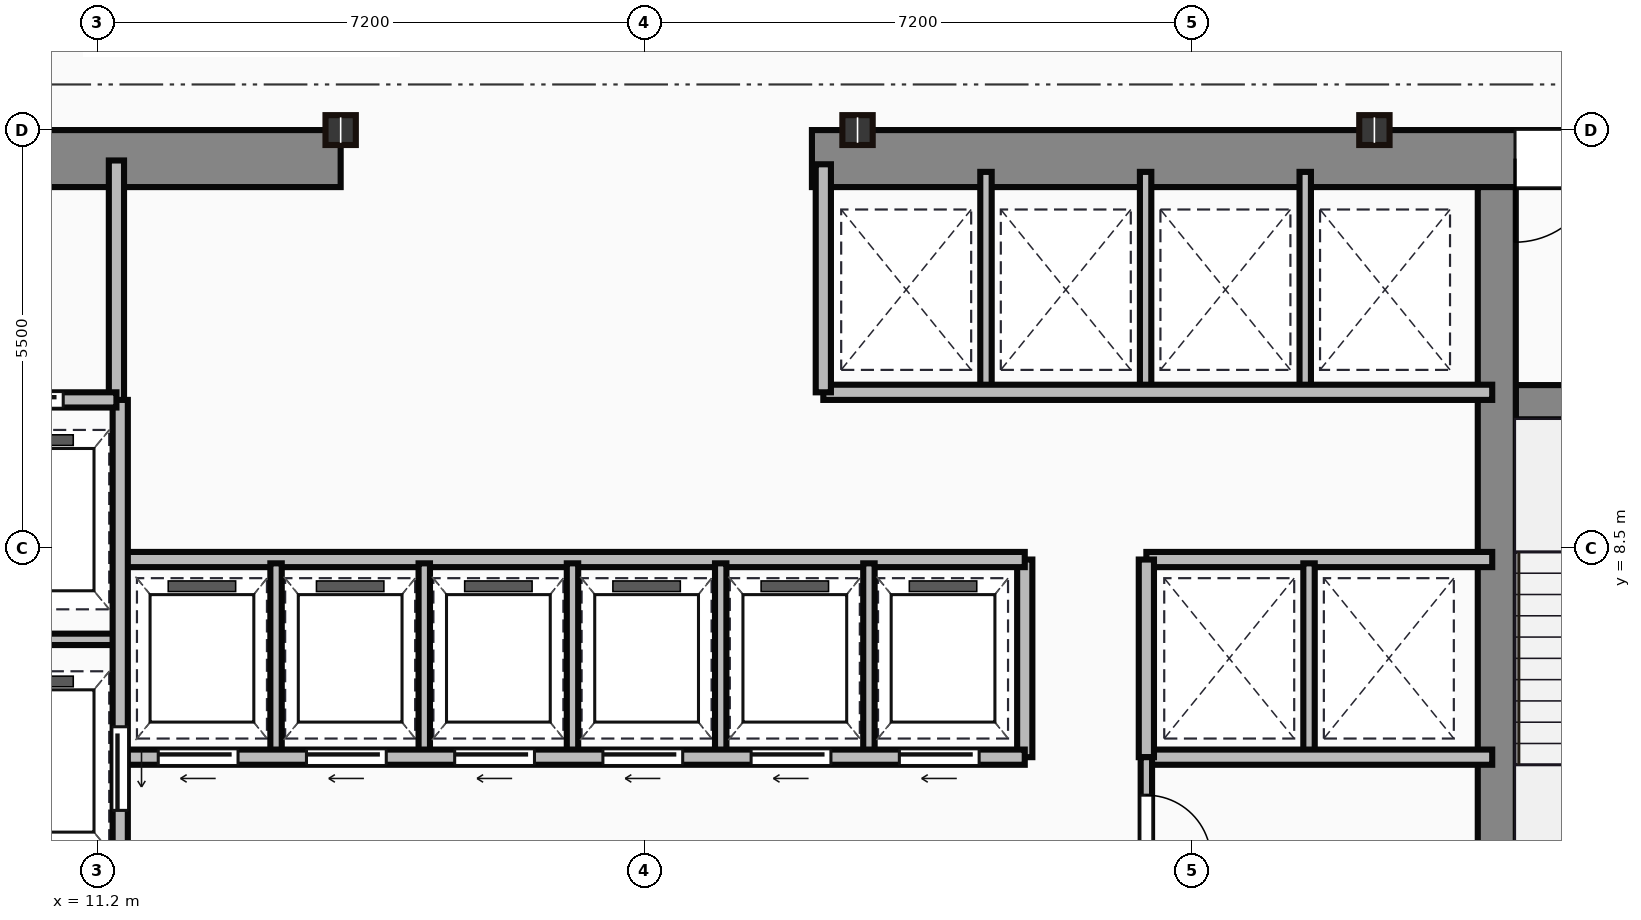
"""IFC4 building model, lengths in metres.
Left out: names, types, materials, properties, quantities, classifications, styles, units other than length and angle.
Written with IfcOpenShell. Run it as: python <this file> out.ifc"""

import sys

from ifc_helpers import new_model, si_unit, direction, frame, frame_2d, origin, origin_2d, place, context, subcontext, project, spatial, rectangle, i_section, extrude, source, transform, mapped, element, fill, save


model = new_model("IFC4")
c1 = context("Model", 3, precision=1e-05, world=origin(), true_north=direction((0.0, 1.0)))
c2 = subcontext(c1, "Body", "Model", "MODEL_VIEW")
j1 = project(units=[si_unit("LENGTHUNIT", "METRE"), si_unit("PLANEANGLEUNIT", "RADIAN")], contexts=[c1])
p1 = place(None, origin())
s1 = spatial("IfcSite", under=j1, at=p1, CompositionType="ELEMENT")
p2 = place(p1, origin())
s2 = spatial("IfcBuilding", under=s1, at=p2, CompositionType="ELEMENT")
p3 = place(p2, frame((0.0, 0.0, 103.25)))
s3 = spatial("IfcBuildingStorey", under=s2, at=p3, CompositionType="ELEMENT", Elevation=103.25)
m1 = source(origin(), c2, "Body", "SweptSolid", [
    extrude(rectangle(XDim=9.1, YDim=0.75, at=frame_2d((4.55, 0.0))), origin(), (0.0, 0.0, 1.0), 3.65),
])
p4 = place(p3, frame((5.3, 13.625, 0.0), z_axis=(0.0, 0.0, 1.0), x_axis=(1.0, 0.0, 0.0)))
e1 = element("IfcWall", 1, at=p4, inside=s3, PredefinedType="SHEAR", context=c2, shape_type="MappedRepresentation", body=[
    mapped(m1, transform((0.0, 0.0, 0.0))),
])
p5 = place(p4, frame((4.1, 0.0, 0.0)))
e2 = element("IfcOpeningElement", 2, at=p5, cuts=e1, PredefinedType="OPENING", context=c2, shape_type="SweptSolid", body=[
    extrude(rectangle(XDim=1.1, YDim=2.15, at=frame_2d((0.55, 1.075))), frame((0.0, 0.385, 0.0), z_axis=(0.0, -1.0, 0.0), x_axis=(1.0, 0.0, 0.0)), (0.0, 0.0, 1.0), 0.77),
])
m2 = source(origin(), c2, "Body", "SweptSolid", [
    extrude(rectangle(XDim=12.6, YDim=0.75, at=frame_2d((6.3, 0.0))), origin(), (0.0, 0.0, 1.0), 3.65),
])
p6 = place(p3, frame((20.6, 13.625, 0.0), z_axis=(0.0, 0.0, 1.0), x_axis=(1.0, 0.0, 0.0)))
e3 = element("IfcWall", 3, at=p6, inside=s3, PredefinedType="SHEAR", context=c2, shape_type="MappedRepresentation", body=[
    mapped(m2, transform((0.0, 0.0, 0.0))),
])
p7 = place(p6, frame((9.25, 0.0, 0.0)))
e4 = element("IfcOpeningElement", 4, at=p7, cuts=e3, PredefinedType="OPENING", context=c2, shape_type="SweptSolid", body=[
    extrude(rectangle(XDim=1.1, YDim=2.15, at=frame_2d((0.55, 1.075))), frame((0.0, 0.385, 0.0), z_axis=(0.0, -1.0, 0.0), x_axis=(1.0, 0.0, 0.0)), (0.0, 0.0, 1.0), 0.77),
])
m3 = source(origin(), c2, "Body", "SweptSolid", [
    extrude(rectangle(XDim=12.35, YDim=0.5, at=frame_2d((6.175, 0.0))), origin(), (0.0, 0.0, 1.0), 3.65),
])
p8 = place(p3, frame((29.61, 0.9, 0.0), z_axis=(0.0, 0.0, 1.0), x_axis=(0.0, 1.0, 0.0)))
e5 = element("IfcWall", 5, at=p8, inside=s3, PredefinedType="SHEAR", context=c2, shape_type="MappedRepresentation", body=[
    mapped(m3, transform((0.0, 0.0, 0.0))),
])
m4 = source(origin(), c2, "Body", "SweptSolid", [
    extrude(rectangle(XDim=3.39, YDim=0.45, at=frame_2d((1.695, 0.0))), origin(), (0.0, 0.0, 1.0), 3.65),
])
p9 = place(p3, frame((29.86, 10.42, 0.0), z_axis=(0.0, 0.0, 1.0), x_axis=(1.0, 0.0, 0.0)))
e6 = element("IfcWall", 6, at=p9, inside=s3, PredefinedType="SHEAR", context=c2, shape_type="MappedRepresentation", body=[
    mapped(m4, transform((0.0, 0.0, 0.0))),
])
p10 = place(p9, frame((1.1, 0.0, 0.0)))
e7 = element("IfcOpeningElement", 7, at=p10, cuts=e6, PredefinedType="OPENING", context=c2, shape_type="SweptSolid", body=[
    extrude(rectangle(XDim=1.1, YDim=2.15, at=frame_2d((0.55, 1.075))), frame((0.0, 0.235, 0.0), z_axis=(0.0, -1.0, 0.0), x_axis=(1.0, 0.0, 0.0)), (0.0, 0.0, 1.0), 0.47),
])
m5 = source(origin(), c2, "Body", "SweptSolid", [
    extrude(i_section(OverallWidth=0.399, OverallDepth=0.393, WebThickness=0.023, FlangeThickness=0.037, at=origin_2d()), origin(), (0.0, 0.0, 1.0), 3.65),
])
for number, where, z_axis, x_axis in (
    (8, (14.4, 14.0, 0.0), (0.0, 0.0, 1.0), (1.0, 0.0, 0.0)),
    (9, (21.2, 14.0, 0.0), (0.0, 0.0, 1.0), (1.0, 0.0, 0.0)),
    (10, (28.0, 14.0, 0.0), (0.0, 0.0, 1.0), (1.0, 0.0, 0.0)),
):
    element("IfcColumn", number, at=place(p3, frame(where, z_axis=z_axis, x_axis=x_axis)), inside=s3, PredefinedType="COLUMN", context=c2, shape_type="MappedRepresentation", body=[
        mapped(m5, transform((0.0, 0.0, 0.0))),
    ])
m6 = source(origin(), c2, "Body", "SweptSolid", [
    extrude(rectangle(XDim=3.18, YDim=0.2, at=frame_2d((1.59, 0.0))), origin(), (0.0, 0.0, 1.0), 3.4),
])
p11 = place(p3, frame((11.45, 10.42, 0.0), z_axis=(0.0, 0.0, 1.0), x_axis=(0.0, 1.0, 0.0)))
e11 = element("IfcWall", 11, at=p11, inside=s3, PredefinedType="PARTITIONING", context=c2, shape_type="MappedRepresentation", body=[
    mapped(m6, transform((0.0, 0.0, 0.0))),
])
m7 = source(origin(), c2, "Body", "SweptSolid", [
    extrude(rectangle(XDim=2.35, YDim=0.2, at=frame_2d((1.175, 0.0))), origin(), (0.0, 0.0, 1.0), 3.4),
])
p12 = place(p3, frame((9.1, 10.45, 0.0), z_axis=(0.0, 0.0, 1.0), x_axis=(1.0, 0.0, 0.0)))
e12 = element("IfcWall", 12, at=p12, inside=s3, PredefinedType="PARTITIONING", context=c2, shape_type="MappedRepresentation", body=[
    mapped(m7, transform((0.0, 0.0, 0.0))),
])
p13 = place(p12, frame((0.55, 0.0, 0.0)))
e13 = element("IfcOpeningElement", 13, at=p13, cuts=e12, PredefinedType="OPENING", context=c2, shape_type="SweptSolid", body=[
    extrude(rectangle(XDim=1.1, YDim=2.15, at=frame_2d((0.55, 1.075))), frame((0.0, 0.11, 0.0), z_axis=(0.0, -1.0, 0.0), x_axis=(1.0, 0.0, 0.0)), (0.0, 0.0, 1.0), 0.22),
])
m8 = source(origin(), c2, "Body", "SweptSolid", [
    extrude(rectangle(XDim=9.6, YDim=0.2, at=frame_2d((4.8, 0.0))), origin(), (0.0, 0.0, 1.0), 3.4),
])
p14 = place(p3, frame((11.5, 0.85, 0.0), z_axis=(0.0, 0.0, 1.0), x_axis=(0.0, 1.0, 0.0)))
e14 = element("IfcWall", 14, at=p14, inside=s3, PredefinedType="PARTITIONING", context=c2, shape_type="MappedRepresentation", body=[
    mapped(m8, transform((0.0, 0.0, 0.0))),
])
p15 = place(p14, frame((4.2, 0.0, 0.0)))
e15 = element("IfcOpeningElement", 15, at=p15, cuts=e14, PredefinedType="OPENING", context=c2, shape_type="SweptSolid", body=[
    extrude(rectangle(XDim=1.1, YDim=2.15, at=frame_2d((0.55, 1.075))), frame((0.0, 0.11, 0.0), z_axis=(0.0, -1.0, 0.0), x_axis=(1.0, 0.0, 0.0)), (0.0, 0.0, 1.0), 0.22),
])
p16 = place(p14, frame((0.9, 0.0, 0.0)))
e16 = element("IfcOpeningElement", 16, at=p16, cuts=e14, PredefinedType="OPENING", context=c2, shape_type="SweptSolid", body=[
    extrude(rectangle(XDim=1.2, YDim=2.15, at=frame_2d((0.6, 1.075))), frame((0.0, 0.11, 0.0), z_axis=(0.0, -1.0, 0.0), x_axis=(1.0, 0.0, 0.0)), (0.0, 0.0, 1.0), 0.22),
])
m9 = source(origin(), c2, "Body", "SweptSolid", [
    extrude(rectangle(XDim=2.4, YDim=0.15, at=frame_2d((1.2, 0.0))), origin(), (0.0, 0.0, 1.0), 3.4),
])
p17 = place(p3, frame((9.1, 7.3, 0.0), z_axis=(0.0, 0.0, 1.0), x_axis=(1.0, 0.0, 0.0)))
e17 = element("IfcWall", 17, at=p17, inside=s3, PredefinedType="PARTITIONING", context=c2, shape_type="MappedRepresentation", body=[
    mapped(m9, transform((0.0, 0.0, 0.0))),
])
m10 = source(origin(), c2, "Body", "SweptSolid", [
    extrude(rectangle(XDim=11.85, YDim=0.2, at=frame_2d((5.925, 0.0))), origin(), (0.0, 0.0, 1.0), 3.4),
])
p18 = place(p3, frame((11.55, 5.75, 0.0), z_axis=(0.0, 0.0, 1.0), x_axis=(1.0, 0.0, 0.0)))
e18 = element("IfcWall", 18, at=p18, inside=s3, PredefinedType="PARTITIONING", context=c2, shape_type="MappedRepresentation", body=[
    mapped(m10, transform((0.0, 0.0, 0.0))),
])
p19 = place(p18, frame((0.45, 0.0, 0.0)))
e19 = element("IfcOpeningElement", 19, at=p19, cuts=e18, PredefinedType="OPENING", context=c2, shape_type="SweptSolid", body=[
    extrude(rectangle(XDim=1.05, YDim=2.15, at=frame_2d((0.525, 1.075))), frame((0.0, 0.11, 0.0), z_axis=(0.0, -1.0, 0.0), x_axis=(1.0, 0.0, 0.0)), (0.0, 0.0, 1.0), 0.22),
])
p20 = place(p18, frame((2.4, 0.0, 0.0)))
e20 = element("IfcOpeningElement", 20, at=p20, cuts=e18, PredefinedType="OPENING", context=c2, shape_type="SweptSolid", body=[
    extrude(rectangle(XDim=1.05, YDim=2.15, at=frame_2d((0.525, 1.075))), frame((0.0, 0.11, 0.0), z_axis=(0.0, -1.0, 0.0), x_axis=(1.0, 0.0, 0.0)), (0.0, 0.0, 1.0), 0.22),
])
p21 = place(p18, frame((4.35, 0.0, 0.0)))
e21 = element("IfcOpeningElement", 21, at=p21, cuts=e18, PredefinedType="OPENING", context=c2, shape_type="SweptSolid", body=[
    extrude(rectangle(XDim=1.05, YDim=2.15, at=frame_2d((0.525, 1.075))), frame((0.0, 0.11, 0.0), z_axis=(0.0, -1.0, 0.0), x_axis=(1.0, 0.0, 0.0)), (0.0, 0.0, 1.0), 0.22),
])
p22 = place(p18, frame((6.3, 0.0, 0.0)))
e22 = element("IfcOpeningElement", 22, at=p22, cuts=e18, PredefinedType="OPENING", context=c2, shape_type="SweptSolid", body=[
    extrude(rectangle(XDim=1.05, YDim=2.15, at=frame_2d((0.525, 1.075))), frame((0.0, 0.11, 0.0), z_axis=(0.0, -1.0, 0.0), x_axis=(1.0, 0.0, 0.0)), (0.0, 0.0, 1.0), 0.22),
])
p23 = place(p18, frame((8.25, 0.0, 0.0)))
e23 = element("IfcOpeningElement", 23, at=p23, cuts=e18, PredefinedType="OPENING", context=c2, shape_type="SweptSolid", body=[
    extrude(rectangle(XDim=1.05, YDim=2.15, at=frame_2d((0.525, 1.075))), frame((0.0, 0.11, 0.0), z_axis=(0.0, -1.0, 0.0), x_axis=(1.0, 0.0, 0.0)), (0.0, 0.0, 1.0), 0.22),
])
p24 = place(p18, frame((10.2, 0.0, 0.0)))
e24 = element("IfcOpeningElement", 24, at=p24, cuts=e18, PredefinedType="OPENING", context=c2, shape_type="SweptSolid", body=[
    extrude(rectangle(XDim=1.05, YDim=2.15, at=frame_2d((0.525, 1.075))), frame((0.0, 0.11, 0.0), z_axis=(0.0, -1.0, 0.0), x_axis=(1.0, 0.0, 0.0)), (0.0, 0.0, 1.0), 0.22),
])
p25 = place(p3, frame((11.55, 8.35, 0.0), z_axis=(0.0, 0.0, 1.0), x_axis=(1.0, 0.0, 0.0)))
e25 = element("IfcWall", 25, at=p25, inside=s3, PredefinedType="PARTITIONING", context=c2, shape_type="MappedRepresentation", body=[
    mapped(m10, transform((0.0, 0.0, 0.0))),
])
m11 = source(origin(), c2, "Body", "SweptSolid", [
    extrude(rectangle(XDim=2.6, YDim=0.2, at=frame_2d((1.3, 0.0))), origin(), (0.0, 0.0, 1.0), 3.4),
])
p26 = place(p3, frame((23.4, 5.75, 0.0), z_axis=(0.0, 0.0, 1.0), x_axis=(0.0, 1.0, 0.0)))
e26 = element("IfcWall", 26, at=p26, inside=s3, PredefinedType="PARTITIONING", context=c2, shape_type="MappedRepresentation", body=[
    mapped(m11, transform((0.0, 0.0, 0.0))),
])
m12 = source(origin(), c2, "Body", "SweptSolid", [
    extrude(rectangle(XDim=2.5, YDim=0.15, at=frame_2d((1.25, 0.0))), origin(), (0.0, 0.0, 1.0), 3.4),
])
for number, where, z_axis, x_axis in (
    (27, (13.55, 5.8, 0.0), (0.0, 0.0, 1.0), (0.0, 1.0, 0.0)),
    (28, (15.5, 5.8, 0.0), (0.0, 0.0, 1.0), (0.0, 1.0, 0.0)),
    (29, (17.45, 5.8, 0.0), (0.0, 0.0, 1.0), (0.0, 1.0, 0.0)),
    (30, (19.4, 5.8, 0.0), (0.0, 0.0, 1.0), (0.0, 1.0, 0.0)),
    (31, (21.35, 5.8, 0.0), (0.0, 0.0, 1.0), (0.0, 1.0, 0.0)),
):
    element("IfcWall", number, at=place(p3, frame(where, z_axis=z_axis, x_axis=x_axis)), inside=s3, PredefinedType="PARTITIONING", context=c2, shape_type="MappedRepresentation", body=[
        mapped(m12, transform((0.0, 0.0, 0.0))),
    ])
m13 = source(origin(), c2, "Body", "SweptSolid", [
    extrude(rectangle(XDim=8.8, YDim=0.2, at=frame_2d((4.4, 0.0))), origin(), (0.0, 0.0, 1.0), 3.4),
])
p27 = place(p3, frame((20.75, 10.55, 0.0), z_axis=(0.0, 0.0, 1.0), x_axis=(1.0, 0.0, 0.0)))
e32 = element("IfcWall", 32, at=p27, inside=s3, PredefinedType="PARTITIONING", context=c2, shape_type="MappedRepresentation", body=[
    mapped(m13, transform((0.0, 0.0, 0.0))),
])
m14 = source(origin(), c2, "Body", "SweptSolid", [
    extrude(rectangle(XDim=3.0, YDim=0.2, at=frame_2d((1.5, 0.0))), origin(), (0.0, 0.0, 1.0), 3.4),
])
p28 = place(p3, frame((20.75, 10.55, 0.0), z_axis=(0.0, 0.0, 1.0), x_axis=(0.0, 1.0, 0.0)))
e33 = element("IfcWall", 33, at=p28, inside=s3, PredefinedType="PARTITIONING", context=c2, shape_type="MappedRepresentation", body=[
    mapped(m14, transform((0.0, 0.0, 0.0))),
])
m15 = source(origin(), c2, "Body", "SweptSolid", [
    extrude(rectangle(XDim=2.85, YDim=0.15, at=frame_2d((1.425, 0.0))), origin(), (0.0, 0.0, 1.0), 3.4),
])
for number, where, z_axis, x_axis in (
    (34, (22.89, 10.6, 0.0), (0.0, 0.0, 1.0), (0.0, 1.0, 0.0)),
    (35, (24.99, 10.6, 0.0), (0.0, 0.0, 1.0), (0.0, 1.0, 0.0)),
    (36, (27.09, 10.6, 0.0), (0.0, 0.0, 1.0), (0.0, 1.0, 0.0)),
):
    element("IfcWall", number, at=place(p3, frame(where, z_axis=z_axis, x_axis=x_axis)), inside=s3, PredefinedType="PARTITIONING", context=c2, shape_type="MappedRepresentation", body=[
        mapped(m15, transform((0.0, 0.0, 0.0))),
    ])
m16 = source(origin(), c2, "Body", "SweptSolid", [
    extrude(rectangle(XDim=4.55, YDim=0.2, at=frame_2d((2.275, 0.0))), origin(), (0.0, 0.0, 1.0), 3.4),
])
for number, where, z_axis, x_axis in (
    (37, (25.0, 8.35, 0.0), (0.0, 0.0, 1.0), (1.0, 0.0, 0.0)),
    (38, (25.0, 5.75, 0.0), (0.0, 0.0, 1.0), (1.0, 0.0, 0.0)),
):
    element("IfcWall", number, at=place(p3, frame(where, z_axis=z_axis, x_axis=x_axis)), inside=s3, PredefinedType="PARTITIONING", context=c2, shape_type="MappedRepresentation", body=[
        mapped(m16, transform((0.0, 0.0, 0.0))),
    ])
p29 = place(p3, frame((25.0, 5.75, 0.0), z_axis=(0.0, 0.0, 1.0), x_axis=(0.0, 1.0, 0.0)))
e39 = element("IfcWall", 39, at=p29, inside=s3, PredefinedType="PARTITIONING", context=c2, shape_type="MappedRepresentation", body=[
    mapped(m11, transform((0.0, 0.0, 0.0))),
])
p30 = place(p3, frame((27.14, 5.8, 0.0), z_axis=(0.0, 0.0, 1.0), x_axis=(0.0, 1.0, 0.0)))
e40 = element("IfcWall", 40, at=p30, inside=s3, PredefinedType="PARTITIONING", context=c2, shape_type="MappedRepresentation", body=[
    mapped(m12, transform((0.0, 0.0, 0.0))),
])
m17 = source(origin(), c2, "Body", "SweptSolid", [
    extrude(rectangle(XDim=4.9, YDim=0.15, at=frame_2d((2.45, 0.0))), origin(), (0.0, 0.0, 1.0), 3.4),
])
p31 = place(p3, frame((25.0, 0.85, 0.0), z_axis=(0.0, 0.0, 1.0), x_axis=(0.0, 1.0, 0.0)))
e41 = element("IfcWall", 41, at=p31, inside=s3, PredefinedType="PARTITIONING", context=c2, shape_type="MappedRepresentation", body=[
    mapped(m17, transform((0.0, 0.0, 0.0))),
])
p32 = place(p31, frame((1.85, 0.0, 0.0)))
e42 = element("IfcOpeningElement", 42, at=p32, cuts=e41, PredefinedType="OPENING", context=c2, shape_type="SweptSolid", body=[
    extrude(rectangle(XDim=0.95, YDim=2.15, at=frame_2d((0.475, 1.075))), frame((0.0, 0.085, 0.0), z_axis=(0.0, -1.0, 0.0), x_axis=(1.0, 0.0, 0.0)), (0.0, 0.0, 1.0), 0.17),
])
p33 = place(p31, frame((3.55, 0.0, 0.0)))
e43 = element("IfcOpeningElement", 43, at=p33, cuts=e41, PredefinedType="OPENING", context=c2, shape_type="SweptSolid", body=[
    extrude(rectangle(XDim=0.85, YDim=2.15, at=frame_2d((0.425, 1.075))), frame((0.0, 0.085, 0.0), z_axis=(0.0, -1.0, 0.0), x_axis=(1.0, 0.0, 0.0)), (0.0, 0.0, 1.0), 0.17),
])
m18 = source(origin(), c2, "Body", "SweptSolid", [
    extrude(rectangle(XDim=1.1, YDim=2.15, at=frame_2d((0.55, 1.075))), frame((0.0, 0.025, 0.0), z_axis=(0.0, -1.0, 0.0), x_axis=(1.0, 0.0, 0.0)), (0.0, 0.0, 1.0), 0.05),
])
p34 = place(p7, origin())
e44 = element("IfcDoor", 44, at=p34, inside=s3, OperationType="SINGLE_SWING_LEFT", PredefinedType="DOOR", context=c2, shape_type="MappedRepresentation", body=[
    mapped(m18, transform((0.0, 0.0, 0.0))),
])
fill(e4, e44)
p35 = place(p13, origin())
e45 = element("IfcDoor", 45, at=p35, inside=s3, OperationType="SLIDING_TO_LEFT", PredefinedType="DOOR", context=c2, shape_type="MappedRepresentation", body=[
    mapped(m18, transform((0.0, 0.0, 0.0))),
])
fill(e13, e45)
p36 = place(p15, frame((1.1, 0.0, 0.0), z_axis=(0.0, 0.0, 1.0), x_axis=(-1.0, 0.0, 0.0)))
e46 = element("IfcDoor", 46, at=p36, inside=s3, OperationType="SLIDING_TO_LEFT", PredefinedType="DOOR", context=c2, shape_type="MappedRepresentation", body=[
    mapped(m18, transform((0.0, 0.0, 0.0))),
])
fill(e15, e46)
m19 = source(origin(), c2, "Body", "SweptSolid", [
    extrude(rectangle(XDim=1.05, YDim=2.15, at=frame_2d((0.525, 1.075))), frame((0.0, 0.025, 0.0), z_axis=(0.0, -1.0, 0.0), x_axis=(1.0, 0.0, 0.0)), (0.0, 0.0, 1.0), 0.05),
])
p37 = place(p19, frame((1.05, 0.0, 0.0), z_axis=(0.0, 0.0, 1.0), x_axis=(-1.0, 0.0, 0.0)))
e47 = element("IfcDoor", 47, at=p37, inside=s3, OperationType="SLIDING_TO_LEFT", PredefinedType="DOOR", context=c2, shape_type="MappedRepresentation", body=[
    mapped(m19, transform((0.0, 0.0, 0.0))),
])
fill(e19, e47)
p38 = place(p20, frame((1.05, 0.0, 0.0), z_axis=(0.0, 0.0, 1.0), x_axis=(-1.0, 0.0, 0.0)))
e48 = element("IfcDoor", 48, at=p38, inside=s3, OperationType="SLIDING_TO_LEFT", PredefinedType="DOOR", context=c2, shape_type="MappedRepresentation", body=[
    mapped(m19, transform((0.0, 0.0, 0.0))),
])
fill(e20, e48)
p39 = place(p21, frame((1.05, 0.0, 0.0), z_axis=(0.0, 0.0, 1.0), x_axis=(-1.0, 0.0, 0.0)))
e49 = element("IfcDoor", 49, at=p39, inside=s3, OperationType="SLIDING_TO_LEFT", PredefinedType="DOOR", context=c2, shape_type="MappedRepresentation", body=[
    mapped(m19, transform((0.0, 0.0, 0.0))),
])
fill(e21, e49)
p40 = place(p22, frame((1.05, 0.0, 0.0), z_axis=(0.0, 0.0, 1.0), x_axis=(-1.0, 0.0, 0.0)))
e50 = element("IfcDoor", 50, at=p40, inside=s3, OperationType="SLIDING_TO_LEFT", PredefinedType="DOOR", context=c2, shape_type="MappedRepresentation", body=[
    mapped(m19, transform((0.0, 0.0, 0.0))),
])
fill(e22, e50)
p41 = place(p23, frame((1.05, 0.0, 0.0), z_axis=(0.0, 0.0, 1.0), x_axis=(-1.0, 0.0, 0.0)))
e51 = element("IfcDoor", 51, at=p41, inside=s3, OperationType="SLIDING_TO_LEFT", PredefinedType="DOOR", context=c2, shape_type="MappedRepresentation", body=[
    mapped(m19, transform((0.0, 0.0, 0.0))),
])
fill(e23, e51)
p42 = place(p24, frame((1.05, 0.0, 0.0), z_axis=(0.0, 0.0, 1.0), x_axis=(-1.0, 0.0, 0.0)))
e52 = element("IfcDoor", 52, at=p42, inside=s3, OperationType="SLIDING_TO_LEFT", PredefinedType="DOOR", context=c2, shape_type="MappedRepresentation", body=[
    mapped(m19, transform((0.0, 0.0, 0.0))),
])
fill(e24, e52)
m20 = source(origin(), c2, "Body", "SweptSolid", [
    extrude(rectangle(XDim=0.85, YDim=2.15, at=frame_2d((0.425, 1.075))), frame((0.0, 0.025, 0.0), z_axis=(0.0, -1.0, 0.0), x_axis=(1.0, 0.0, 0.0)), (0.0, 0.0, 1.0), 0.05),
])
p43 = place(p33, origin())
e53 = element("IfcDoor", 53, at=p43, inside=s3, OperationType="SINGLE_SWING_LEFT", PredefinedType="DOOR", context=c2, shape_type="MappedRepresentation", body=[
    mapped(m20, transform((0.0, 0.0, 0.0))),
])
fill(e43, e53)
save(model, sys.argv[1])
